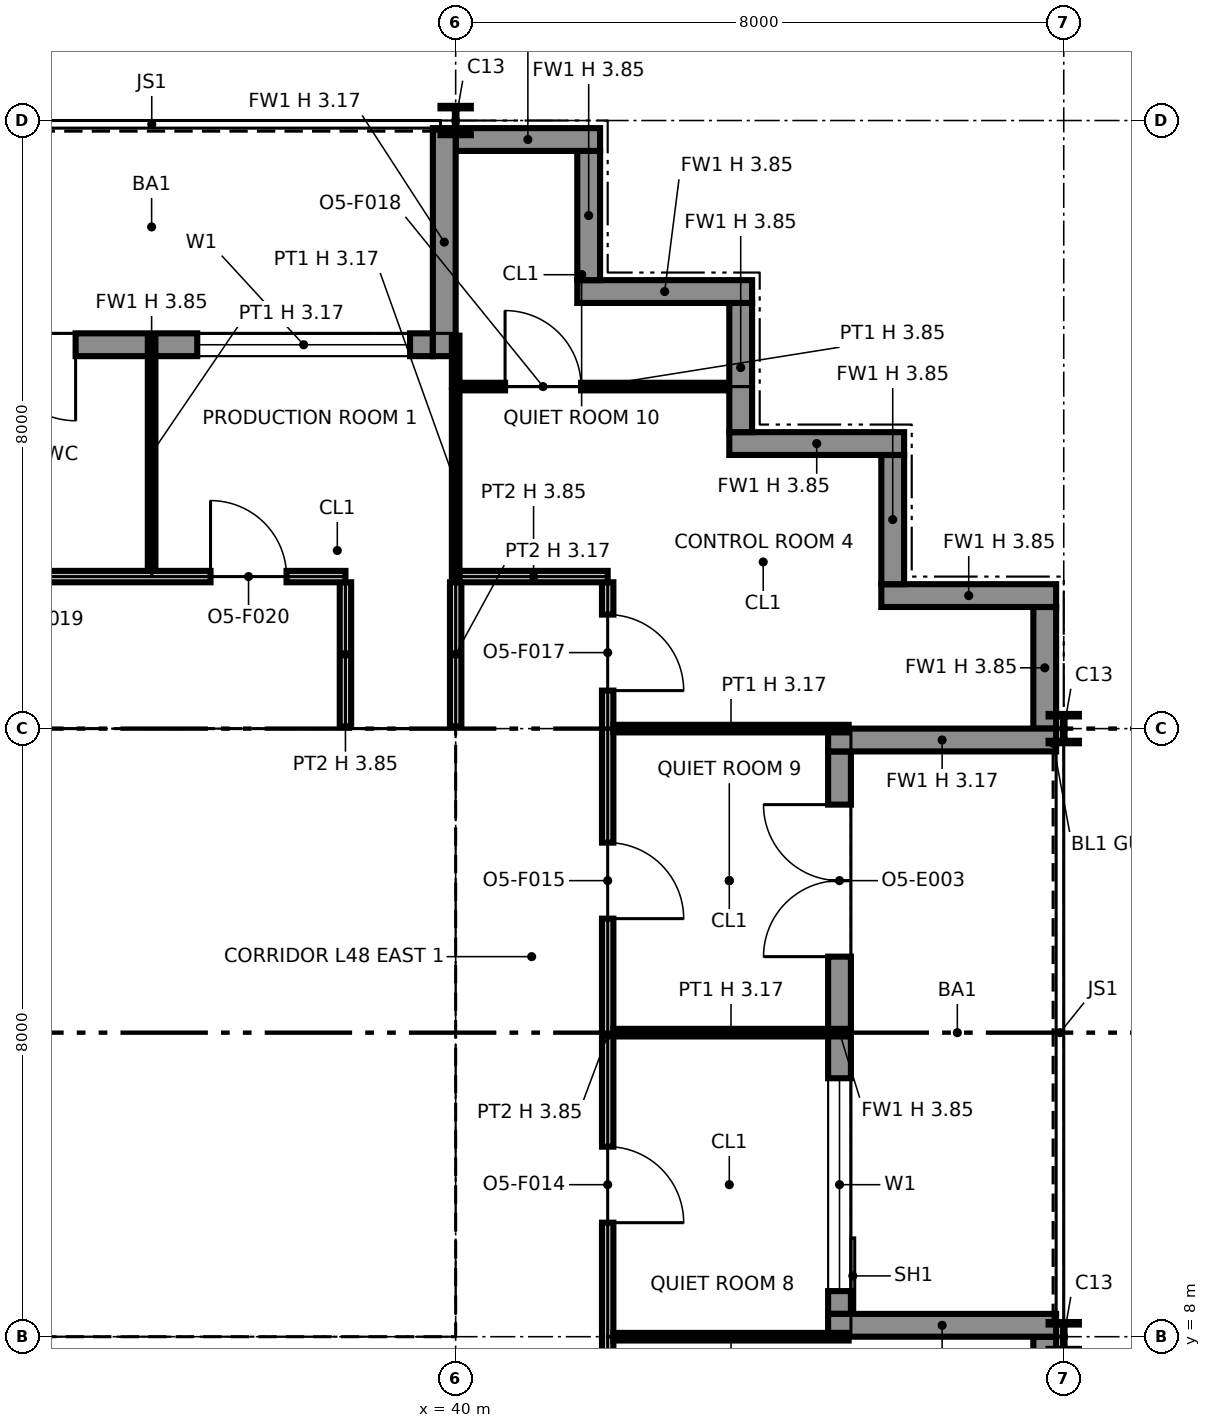
"""IFC4 building model, lengths in metres.
Left out: names, types, materials, properties, quantities, classifications, styles, units other than length and angle.
Written with IfcOpenShell. Run it as: python <this file> out.ifc"""

import sys

from ifc_helpers import new_model, si_unit, direction, frame, frame_2d, origin, origin_2d, place, context, subcontext, project, spatial, polyline, rectangle, i_section, outline, extrude, element, fill, save


model = new_model("IFC4")
c1 = context("Model", 3, precision=1e-05, world=origin(), true_north=direction((0.0, 1.0)))
c2 = subcontext(c1, "Body", "Model", "MODEL_VIEW")
j1 = project(units=[si_unit("LENGTHUNIT", "METRE"), si_unit("PLANEANGLEUNIT", "RADIAN")], contexts=[c1])
p1 = place(None, origin())
s1 = spatial("IfcSite", under=j1, at=p1, CompositionType="ELEMENT")
p2 = place(p1, origin())
s2 = spatial("IfcBuilding", under=s1, at=p2, CompositionType="ELEMENT")
p3 = place(p2, frame((0.0, 0.0, 225.0)))
s3 = spatial("IfcBuildingStorey", under=s2, at=p3, CompositionType="ELEMENT", Elevation=225.0)
for number, where, z_axis, x_axis in (
    (1, (40.0, 8.0, 0.0), (0.0, 0.0, 1.0), (1.0, 0.0, 0.0)),
    (2, (40.0, 16.0, 0.0), (0.0, 0.0, 1.0), (1.0, 0.0, 0.0)),
):
    element("IfcColumn", number, at=place(p3, frame(where, z_axis=z_axis, x_axis=x_axis)), inside=s3, PredefinedType="COLUMN", context=c2, shape_type="SweptSolid", body=[
        extrude(i_section(OverallWidth=0.373, OverallDepth=0.368, WebThickness=0.015, FlangeThickness=0.024, at=origin_2d()), origin(), (0.0, 0.0, 1.0), 3.85),
    ])
for number, where, z_axis, x_axis in (
    (3, (40.0, 24.0, 0.0), (0.0, 0.0, 1.0), (1.0, 0.0, 0.0)),
    (4, (48.0, 8.0, 0.0), (0.0, 0.0, 1.0), (1.0, 0.0, 0.0)),
    (5, (48.0, 16.0, 0.0), (0.0, 0.0, 1.0), (1.0, 0.0, 0.0)),
):
    element("IfcColumn", number, at=place(p3, frame(where, z_axis=z_axis, x_axis=x_axis)), inside=s3, PredefinedType="COLUMN", context=c2, shape_type="SweptSolid", body=[
        extrude(i_section(OverallWidth=0.399, OverallDepth=0.386, WebThickness=0.021, FlangeThickness=0.033, at=origin_2d()), origin(), (0.0, 0.0, 1.0), 3.85),
    ])
p4 = place(p3, frame((47.75, 6.4, 0.0), z_axis=(0.0, 0.0, 1.0), x_axis=(0.0, 1.0, 0.0)))
e6 = element("IfcWall", 6, at=p4, inside=s3, PredefinedType="SOLIDWALL", context=c2, shape_type="SweptSolid", body=[
    extrude(rectangle(XDim=1.6, YDim=0.3, at=frame_2d((0.8, 0.0))), origin(), (0.0, 0.0, 1.0), 3.85),
])
p5 = place(p3, frame((45.05, 8.3, 0.0), z_axis=(0.0, 0.0, 1.0), x_axis=(0.0, 1.0, 0.0)))
e7 = element("IfcWall", 7, at=p5, inside=s3, PredefinedType="SOLIDWALL", context=c2, shape_type="SweptSolid", body=[
    extrude(rectangle(XDim=7.4, YDim=0.3, at=frame_2d((3.7, 0.0))), origin(), (0.0, 0.0, 1.0), 3.85),
])
p6 = place(p5, frame((0.3, 0.0, 0.9)))
e8 = element("IfcOpeningElement", 8, at=p6, cuts=e7, PredefinedType="OPENING", context=c2, shape_type="SweptSolid", body=[
    extrude(rectangle(XDim=2.8, YDim=2.2, at=frame_2d((1.4, 1.1))), frame((0.0, 0.16, 0.0), z_axis=(0.0, -1.0, 0.0), x_axis=(1.0, 0.0, 0.0)), (0.0, 0.0, 1.0), 0.32),
])
p7 = place(p5, frame((4.7, 0.0, 0.0)))
e9 = element("IfcOpeningElement", 9, at=p7, cuts=e7, PredefinedType="OPENING", context=c2, shape_type="SweptSolid", body=[
    extrude(rectangle(XDim=2.0, YDim=2.4, at=frame_2d((1.0, 1.2))), frame((0.0, 0.16, 0.0), z_axis=(0.0, -1.0, 0.0), x_axis=(1.0, 0.0, 0.0)), (0.0, 0.0, 1.0), 0.32),
])
for number, where, z_axis, x_axis in (
    (10, (47.9, 8.15, 0.0), (0.0, 0.0, 1.0), (-1.0, 0.0, 0.0)),
    (11, (47.9, 15.85, 0.0), (0.0, 0.0, 1.0), (-1.0, 0.0, 0.0)),
):
    element("IfcWall", number, at=place(p3, frame(where, z_axis=z_axis, x_axis=x_axis)), inside=s3, PredefinedType="SOLIDWALL", context=c2, shape_type="SweptSolid", body=[
        extrude(rectangle(XDim=3.0, YDim=0.3, at=frame_2d((1.5, 0.0))), origin(), (0.0, 0.0, 1.0), 3.171),
    ])
p8 = place(p3, frame((47.75, 16.0, 0.0), z_axis=(0.0, 0.0, 1.0), x_axis=(0.0, 1.0, 0.0)))
e12 = element("IfcWall", 12, at=p8, inside=s3, PredefinedType="SOLIDWALL", context=c2, shape_type="SweptSolid", body=[
    extrude(rectangle(XDim=1.6, YDim=0.3, at=frame_2d((0.8, 0.0))), origin(), (0.0, 0.0, 1.0), 3.85),
])
p9 = place(p3, frame((47.9, 17.75, 0.0), z_axis=(0.0, 0.0, 1.0), x_axis=(-1.0, 0.0, 0.0)))
e13 = element("IfcWall", 13, at=p9, inside=s3, PredefinedType="SOLIDWALL", context=c2, shape_type="SweptSolid", body=[
    extrude(rectangle(XDim=2.3, YDim=0.3, at=frame_2d((1.15, 0.0))), origin(), (0.0, 0.0, 1.0), 3.85),
])
p10 = place(p3, frame((45.75, 17.9, 0.0), z_axis=(0.0, 0.0, 1.0), x_axis=(0.0, 1.0, 0.0)))
e14 = element("IfcWall", 14, at=p10, inside=s3, PredefinedType="SOLIDWALL", context=c2, shape_type="SweptSolid", body=[
    extrude(rectangle(XDim=1.7, YDim=0.3, at=frame_2d((0.85, 0.0))), origin(), (0.0, 0.0, 1.0), 3.85),
])
p11 = place(p3, frame((45.9, 19.75, 0.0), z_axis=(0.0, 0.0, 1.0), x_axis=(-1.0, 0.0, 0.0)))
e15 = element("IfcWall", 15, at=p11, inside=s3, PredefinedType="SOLIDWALL", context=c2, shape_type="SweptSolid", body=[
    extrude(rectangle(XDim=2.3, YDim=0.3, at=frame_2d((1.15, 0.0))), origin(), (0.0, 0.0, 1.0), 3.85),
])
p12 = place(p3, frame((43.75, 19.9, 0.0), z_axis=(0.0, 0.0, 1.0), x_axis=(0.0, 1.0, 0.0)))
e16 = element("IfcWall", 16, at=p12, inside=s3, PredefinedType="SOLIDWALL", context=c2, shape_type="SweptSolid", body=[
    extrude(rectangle(XDim=1.7, YDim=0.3, at=frame_2d((0.85, 0.0))), origin(), (0.0, 0.0, 1.0), 3.85),
])
p13 = place(p3, frame((43.9, 21.75, 0.0), z_axis=(0.0, 0.0, 1.0), x_axis=(-1.0, 0.0, 0.0)))
e17 = element("IfcWall", 17, at=p13, inside=s3, PredefinedType="SOLIDWALL", context=c2, shape_type="SweptSolid", body=[
    extrude(rectangle(XDim=2.3, YDim=0.3, at=frame_2d((1.15, 0.0))), origin(), (0.0, 0.0, 1.0), 3.85),
])
p14 = place(p3, frame((41.75, 21.9, 0.0), z_axis=(0.0, 0.0, 1.0), x_axis=(0.0, 1.0, 0.0)))
e18 = element("IfcWall", 18, at=p14, inside=s3, PredefinedType="SOLIDWALL", context=c2, shape_type="SweptSolid", body=[
    extrude(rectangle(XDim=1.7, YDim=0.3, at=frame_2d((0.85, 0.0))), origin(), (0.0, 0.0, 1.0), 3.85),
])
p15 = place(p3, frame((41.9, 23.75, 0.0), z_axis=(0.0, 0.0, 1.0), x_axis=(-1.0, 0.0, 0.0)))
e19 = element("IfcWall", 19, at=p15, inside=s3, PredefinedType="SOLIDWALL", context=c2, shape_type="SweptSolid", body=[
    extrude(rectangle(XDim=1.9, YDim=0.3, at=frame_2d((0.95, 0.0))), origin(), (0.0, 0.0, 1.0), 3.85),
])
p16 = place(p3, frame((39.7, 21.05, 0.0), z_axis=(0.0, 0.0, 1.0), x_axis=(-1.0, 0.0, 0.0)))
e20 = element("IfcWall", 20, at=p16, inside=s3, PredefinedType="SOLIDWALL", context=c2, shape_type="SweptSolid", body=[
    extrude(rectangle(XDim=7.4, YDim=0.3, at=frame_2d((3.7, 0.0))), origin(), (0.0, 0.0, 1.0), 3.85),
])
p17 = place(p16, frame((0.3, 0.0, 0.9)))
e21 = element("IfcOpeningElement", 21, at=p17, cuts=e20, PredefinedType="OPENING", context=c2, shape_type="SweptSolid", body=[
    extrude(rectangle(XDim=2.8, YDim=2.2, at=frame_2d((1.4, 1.1))), frame((0.0, 0.16, 0.0), z_axis=(0.0, -1.0, 0.0), x_axis=(1.0, 0.0, 0.0)), (0.0, 0.0, 1.0), 0.32),
])
p18 = place(p16, frame((4.7, 0.0, 0.0)))
e22 = element("IfcOpeningElement", 22, at=p18, cuts=e20, PredefinedType="OPENING", context=c2, shape_type="SweptSolid", body=[
    extrude(rectangle(XDim=2.0, YDim=2.4, at=frame_2d((1.0, 1.2))), frame((0.0, 0.16, 0.0), z_axis=(0.0, -1.0, 0.0), x_axis=(1.0, 0.0, 0.0)), (0.0, 0.0, 1.0), 0.32),
])
p19 = place(p3, frame((39.85, 23.9, 0.0), z_axis=(0.0, 0.0, 1.0), x_axis=(0.0, -1.0, 0.0)))
e23 = element("IfcWall", 23, at=p19, inside=s3, PredefinedType="SOLIDWALL", context=c2, shape_type="SweptSolid", body=[
    extrude(rectangle(XDim=3.0, YDim=0.3, at=frame_2d((1.5, 0.0))), origin(), (0.0, 0.0, 1.0), 3.171),
])
p20 = place(p3, frame((24.65, 8.75, 0.0), z_axis=(0.0, 0.0, 1.0), x_axis=(1.0, 0.0, 0.0)))
e24 = element("IfcWall", 24, at=p20, inside=s3, PredefinedType="PARTITIONING", context=c2, shape_type="SweptSolid", body=[
    extrude(outline(polyline([(0.0, 0.0), (14.7, 0.0), (14.7, 3.85), (7.438, 3.85), (7.438, 3.308), (7.262, 3.308), (7.261, 3.85), (0.0, 3.85), (0.0, 0.0)])), frame((0.0, 0.1, 0.0), z_axis=(0.0, -1.0, 0.0), x_axis=(1.0, 0.0, 0.0)), (0.0, 0.0, 1.0), 0.2),
])
p21 = place(p3, frame((24.65, 15.25, 0.0), z_axis=(0.0, 0.0, 1.0), x_axis=(1.0, 0.0, 0.0)))
e25 = element("IfcWall", 25, at=p21, inside=s3, PredefinedType="PARTITIONING", context=c2, shape_type="SweptSolid", body=[
    extrude(outline(polyline([(0.0, 0.0), (14.7, 0.0), (14.7, 3.85), (7.438, 3.85), (7.438, 3.308), (7.262, 3.308), (7.261, 3.85), (0.0, 3.85), (0.0, 0.0)])), frame((0.0, 0.1, 0.0), z_axis=(0.0, -1.0, 0.0), x_axis=(1.0, 0.0, 0.0)), (0.0, 0.0, 1.0), 0.2),
])
p22 = place(p21, frame((2.85, 0.0, 0.0)))
e26 = element("IfcOpeningElement", 26, at=p22, cuts=e25, PredefinedType="OPENING", context=c2, shape_type="SweptSolid", body=[
    extrude(rectangle(XDim=1.8, YDim=2.1, at=frame_2d((0.9, 1.05))), frame((0.0, 0.11, 0.0), z_axis=(0.0, -1.0, 0.0), x_axis=(1.0, 0.0, 0.0)), (0.0, 0.0, 1.0), 0.22),
])
p23 = place(p21, frame((9.95, 0.0, 0.0), z_axis=(0.0, 0.0, 1.0), x_axis=(-1.0, 0.0, 0.0)))
e27 = element("IfcOpeningElement", 27, at=p23, cuts=e25, PredefinedType="OPENING", context=c2, shape_type="SweptSolid", body=[
    extrude(rectangle(XDim=1.4, YDim=2.1, at=frame_2d((0.7, 1.05))), frame((0.0, 0.11, 0.0), z_axis=(0.0, -1.0, 0.0), x_axis=(1.0, 0.0, 0.0)), (0.0, 0.0, 1.0), 0.22),
])
p24 = place(p21, frame((13.4, 0.0, 0.0), z_axis=(0.0, 0.0, 1.0), x_axis=(-1.0, 0.0, 0.0)))
e28 = element("IfcOpeningElement", 28, at=p24, cuts=e25, PredefinedType="OPENING", context=c2, shape_type="SweptSolid", body=[
    extrude(rectangle(XDim=1.4, YDim=2.1, at=frame_2d((0.7, 1.05))), frame((0.0, 0.11, 0.0), z_axis=(0.0, -1.0, 0.0), x_axis=(1.0, 0.0, 0.0)), (0.0, 0.0, 1.0), 0.22),
])
for number, where, z_axis, x_axis in (
    (29, (35.6, 8.85, 0.0), (0.0, 0.0, 1.0), (0.0, 1.0, 0.0)),
    (30, (39.25, 8.85, 0.0), (0.0, 0.0, 1.0), (0.0, 1.0, 0.0)),
):
    element("IfcWall", number, at=place(p3, frame(where, z_axis=z_axis, x_axis=x_axis)), inside=s3, PredefinedType="PARTITIONING", context=c2, shape_type="SweptSolid", body=[
        extrude(rectangle(XDim=6.3, YDim=0.2, at=frame_2d((3.15, 0.0))), origin(), (0.0, 0.0, 1.0), 3.85),
    ])
p25 = place(p3, frame((42.0, 6.0, 0.0), z_axis=(0.0, 0.0, 1.0), x_axis=(0.0, 1.0, 0.0)))
e31 = element("IfcWall", 31, at=p25, inside=s3, PredefinedType="PARTITIONING", context=c2, shape_type="SweptSolid", body=[
    extrude(outline(polyline([(0.0, 0.0), (11.925, 0.0), (11.925, 3.85), (10.3, 3.85), (10.298, 3.172), (9.702, 3.172), (9.7, 3.85), (6.3, 3.85), (6.298, 3.172), (5.702, 3.172), (5.7, 3.85), (2.3, 3.85), (2.298, 3.172), (1.702, 3.172), (1.7, 3.85), (0.0, 3.85), (0.0, 0.0)])), frame((0.0, 0.075, 0.0), z_axis=(0.0, -1.0, 0.0), x_axis=(1.0, 0.0, 0.0)), (0.0, 0.0, 1.0), 0.15),
])
p26 = place(p25, frame((4.5, 0.0, 0.0), z_axis=(0.0, 0.0, 1.0), x_axis=(-1.0, 0.0, 0.0)))
e32 = element("IfcOpeningElement", 32, at=p26, cuts=e31, PredefinedType="OPENING", context=c2, shape_type="SweptSolid", body=[
    extrude(rectangle(XDim=1.0, YDim=2.1, at=frame_2d((0.5, 1.05))), frame((0.0, 0.085, 0.0), z_axis=(0.0, -1.0, 0.0), x_axis=(1.0, 0.0, 0.0)), (0.0, 0.0, 1.0), 0.17),
])
p27 = place(p25, frame((8.5, 0.0, 0.0), z_axis=(0.0, 0.0, 1.0), x_axis=(-1.0, 0.0, 0.0)))
e33 = element("IfcOpeningElement", 33, at=p27, cuts=e31, PredefinedType="OPENING", context=c2, shape_type="SweptSolid", body=[
    extrude(rectangle(XDim=1.0, YDim=2.1, at=frame_2d((0.5, 1.05))), frame((0.0, 0.085, 0.0), z_axis=(0.0, -1.0, 0.0), x_axis=(1.0, 0.0, 0.0)), (0.0, 0.0, 1.0), 0.17),
])
p28 = place(p25, frame((11.5, 0.0, 0.0), z_axis=(0.0, 0.0, 1.0), x_axis=(-1.0, 0.0, 0.0)))
e34 = element("IfcOpeningElement", 34, at=p28, cuts=e31, PredefinedType="OPENING", context=c2, shape_type="SweptSolid", body=[
    extrude(rectangle(XDim=1.0, YDim=2.1, at=frame_2d((0.5, 1.05))), frame((0.0, 0.085, 0.0), z_axis=(0.0, -1.0, 0.0), x_axis=(1.0, 0.0, 0.0)), (0.0, 0.0, 1.0), 0.17),
])
for number, where, z_axis, x_axis in (
    (35, (42.075, 8.0, 0.0), (0.0, 0.0, 1.0), (1.0, 0.0, 0.0)),
    (36, (42.075, 12.0, 0.0), (0.0, 0.0, 1.0), (1.0, 0.0, 0.0)),
    (37, (42.075, 16.0, 0.0), (0.0, 0.0, 1.0), (1.0, 0.0, 0.0)),
):
    element("IfcWall", number, at=place(p3, frame(where, z_axis=z_axis, x_axis=x_axis)), inside=s3, PredefinedType="PARTITIONING", context=c2, shape_type="SweptSolid", body=[
        extrude(rectangle(XDim=3.095, YDim=0.1, at=frame_2d((1.547, 0.0))), origin(), (0.0, 0.0, 1.0), 3.172),
    ])
p29 = place(p3, frame((38.55, 16.03, 0.0), z_axis=(0.0, 0.0, 1.0), x_axis=(0.0, 1.0, 0.0)))
e38 = element("IfcWall", 38, at=p29, inside=s3, PredefinedType="PARTITIONING", context=c2, shape_type="SweptSolid", body=[
    extrude(rectangle(XDim=1.895, YDim=0.15, at=frame_2d((0.948, 0.0))), origin(), (0.0, 0.0, 1.0), 3.85),
])
p30 = place(p3, frame((40.0, 16.03, 0.0), z_axis=(0.0, 0.0, 1.0), x_axis=(0.0, 1.0, 0.0)))
e39 = element("IfcWall", 39, at=p30, inside=s3, PredefinedType="PARTITIONING", context=c2, shape_type="SweptSolid", body=[
    extrude(rectangle(XDim=1.895, YDim=0.15, at=frame_2d((0.948, 0.0))), origin(), (0.0, 0.0, 1.0), 3.172),
])
p31 = place(p3, frame((26.075, 18.0, 0.0), z_axis=(0.0, 0.0, 1.0), x_axis=(1.0, 0.0, 0.0)))
e40 = element("IfcWall", 40, at=p31, inside=s3, PredefinedType="PARTITIONING", context=c2, shape_type="SweptSolid", body=[
    extrude(rectangle(XDim=12.475, YDim=0.15, at=frame_2d((6.238, 0.0))), origin(), (0.0, 0.0, 1.0), 3.85),
])
p32 = place(p31, frame((7.425, 0.0, 0.0)))
e41 = element("IfcOpeningElement", 41, at=p32, cuts=e40, PredefinedType="OPENING", context=c2, shape_type="SweptSolid", body=[
    extrude(rectangle(XDim=1.0, YDim=2.1, at=frame_2d((0.5, 1.05))), frame((0.0, 0.085, 0.0), z_axis=(0.0, -1.0, 0.0), x_axis=(1.0, 0.0, 0.0)), (0.0, 0.0, 1.0), 0.17),
])
p33 = place(p31, frame((10.7, 0.0, 0.0)))
e42 = element("IfcOpeningElement", 42, at=p33, cuts=e40, PredefinedType="OPENING", context=c2, shape_type="SweptSolid", body=[
    extrude(rectangle(XDim=1.0, YDim=2.1, at=frame_2d((0.5, 1.05))), frame((0.0, 0.085, 0.0), z_axis=(0.0, -1.0, 0.0), x_axis=(1.0, 0.0, 0.0)), (0.0, 0.0, 1.0), 0.17),
])
p34 = place(p31, frame((2.925, 0.0, 0.0)))
e43 = element("IfcOpeningElement", 43, at=p34, cuts=e40, PredefinedType="OPENING", context=c2, shape_type="SweptSolid", body=[
    extrude(rectangle(XDim=1.0, YDim=2.1, at=frame_2d((0.5, 1.05))), frame((0.0, 0.085, 0.0), z_axis=(0.0, -1.0, 0.0), x_axis=(1.0, 0.0, 0.0)), (0.0, 0.0, 1.0), 0.17),
])
p35 = place(p3, frame((36.0, 18.075, 0.0), z_axis=(0.0, 0.0, 1.0), x_axis=(0.0, 1.0, 0.0)))
e44 = element("IfcWall", 44, at=p35, inside=s3, PredefinedType="PARTITIONING", context=c2, shape_type="SweptSolid", body=[
    extrude(rectangle(XDim=3.095, YDim=0.1, at=frame_2d((1.547, 0.0))), origin(), (0.0, 0.0, 1.0), 3.172),
])
p36 = place(p3, frame((40.05, 18.0, 0.0), z_axis=(0.0, 0.0, 1.0), x_axis=(1.0, 0.0, 0.0)))
e45 = element("IfcWall", 45, at=p36, inside=s3, PredefinedType="PARTITIONING", context=c2, shape_type="SweptSolid", body=[
    extrude(rectangle(XDim=1.95, YDim=0.15, at=frame_2d((0.975, 0.0))), origin(), (0.0, 0.0, 1.0), 3.85),
])
p37 = place(p3, frame((40.0, 18.0, 0.0), z_axis=(0.0, 0.0, 1.0), x_axis=(0.0, 1.0, 0.0)))
e46 = element("IfcWall", 46, at=p37, inside=s3, PredefinedType="PARTITIONING", context=c2, shape_type="SweptSolid", body=[
    extrude(rectangle(XDim=2.45, YDim=0.1, at=frame_2d((1.225, 0.0))), origin(), (0.0, 0.0, 1.0), 3.172),
])
p38 = place(p3, frame((40.05, 20.5, 0.0), z_axis=(0.0, 0.0, 1.0), x_axis=(1.0, 0.0, 0.0)))
e47 = element("IfcWall", 47, at=p38, inside=s3, PredefinedType="PARTITIONING", context=c2, shape_type="SweptSolid", body=[
    extrude(rectangle(XDim=3.52, YDim=0.1, at=frame_2d((1.76, 0.0))), origin(), (0.0, 0.0, 1.0), 3.85),
])
p39 = place(p38, frame((0.6, 0.0, 0.0)))
e48 = element("IfcOpeningElement", 48, at=p39, cuts=e47, PredefinedType="OPENING", context=c2, shape_type="SweptSolid", body=[
    extrude(rectangle(XDim=1.0, YDim=2.1, at=frame_2d((0.5, 1.05))), frame((0.0, 0.06, 0.0), z_axis=(0.0, -1.0, 0.0), x_axis=(1.0, 0.0, 0.0)), (0.0, 0.0, 1.0), 0.12),
])
p40 = place(p3, frame((40.0, 20.5, 0.0), z_axis=(0.0, 0.0, 1.0), x_axis=(0.0, 1.0, 0.0)))
e49 = element("IfcWall", 49, at=p40, inside=s3, PredefinedType="PARTITIONING", context=c2, shape_type="SweptSolid", body=[
    extrude(rectangle(XDim=0.67, YDim=0.1, at=frame_2d((0.335, 0.0))), origin(), (0.0, 0.0, 1.0), 3.172),
])
p41 = place(p6, origin())
e50 = element("IfcWindow", 50, at=p41, inside=s3, PartitioningType="SINGLE_PANEL", PredefinedType="WINDOW", context=c2, shape_type="SweptSolid", body=[
    extrude(rectangle(XDim=2.8, YDim=2.2, at=frame_2d((1.4, 1.1))), frame((0.0, 0.03, 0.0), z_axis=(0.0, -1.0, 0.0), x_axis=(1.0, 0.0, 0.0)), (0.0, 0.0, 1.0), 0.06),
])
fill(e8, e50)
p42 = place(p7, origin())
e51 = element("IfcDoor", 51, at=p42, inside=s3, OperationType="DOUBLE_DOOR_SINGLE_SWING", PredefinedType="DOOR", context=c2, shape_type="SweptSolid", body=[
    extrude(rectangle(XDim=2.0, YDim=2.4, at=frame_2d((1.0, 1.2))), frame((0.0, 0.025, 0.0), z_axis=(0.0, -1.0, 0.0), x_axis=(1.0, 0.0, 0.0)), (0.0, 0.0, 1.0), 0.05),
])
fill(e9, e51)
p43 = place(p17, origin())
e52 = element("IfcWindow", 52, at=p43, inside=s3, PartitioningType="SINGLE_PANEL", PredefinedType="WINDOW", context=c2, shape_type="SweptSolid", body=[
    extrude(rectangle(XDim=2.8, YDim=2.2, at=frame_2d((1.4, 1.1))), frame((0.0, 0.03, 0.0), z_axis=(0.0, -1.0, 0.0), x_axis=(1.0, 0.0, 0.0)), (0.0, 0.0, 1.0), 0.06),
])
fill(e21, e52)
p44 = place(p18, origin())
e53 = element("IfcDoor", 53, at=p44, inside=s3, OperationType="DOUBLE_DOOR_SINGLE_SWING", PredefinedType="DOOR", context=c2, shape_type="SweptSolid", body=[
    extrude(rectangle(XDim=2.0, YDim=2.4, at=frame_2d((1.0, 1.2))), frame((0.0, 0.025, 0.0), z_axis=(0.0, -1.0, 0.0), x_axis=(1.0, 0.0, 0.0)), (0.0, 0.0, 1.0), 0.05),
])
fill(e22, e53)
p45 = place(p24, origin())
e54 = element("IfcDoor", 54, at=p45, inside=s3, OperationType="DOUBLE_DOOR_SINGLE_SWING", PredefinedType="NOTDEFINED", context=c2, shape_type="SweptSolid", body=[
    extrude(rectangle(XDim=1.4, YDim=2.1, at=frame_2d((0.7, 1.05))), frame((0.0, 0.025, 0.0), z_axis=(0.0, -1.0, 0.0), x_axis=(1.0, 0.0, 0.0)), (0.0, 0.0, 1.0), 0.05),
])
fill(e28, e54)
p46 = place(p26, origin())
e55 = element("IfcDoor", 55, at=p46, inside=s3, OperationType="SINGLE_SWING_RIGHT", PredefinedType="DOOR", context=c2, shape_type="SweptSolid", body=[
    extrude(rectangle(XDim=1.0, YDim=2.1, at=frame_2d((0.5, 1.05))), frame((0.0, 0.025, 0.0), z_axis=(0.0, -1.0, 0.0), x_axis=(1.0, 0.0, 0.0)), (0.0, 0.0, 1.0), 0.05),
])
fill(e32, e55)
p47 = place(p27, origin())
e56 = element("IfcDoor", 56, at=p47, inside=s3, OperationType="SINGLE_SWING_RIGHT", PredefinedType="DOOR", context=c2, shape_type="SweptSolid", body=[
    extrude(rectangle(XDim=1.0, YDim=2.1, at=frame_2d((0.5, 1.05))), frame((0.0, 0.025, 0.0), z_axis=(0.0, -1.0, 0.0), x_axis=(1.0, 0.0, 0.0)), (0.0, 0.0, 1.0), 0.05),
])
fill(e33, e56)
p48 = place(p28, origin())
e57 = element("IfcDoor", 57, at=p48, inside=s3, OperationType="SINGLE_SWING_RIGHT", PredefinedType="DOOR", context=c2, shape_type="SweptSolid", body=[
    extrude(rectangle(XDim=1.0, YDim=2.1, at=frame_2d((0.5, 1.05))), frame((0.0, 0.025, 0.0), z_axis=(0.0, -1.0, 0.0), x_axis=(1.0, 0.0, 0.0)), (0.0, 0.0, 1.0), 0.05),
])
fill(e34, e57)
p49 = place(p39, origin())
e58 = element("IfcDoor", 58, at=p49, inside=s3, OperationType="SINGLE_SWING_LEFT", PredefinedType="DOOR", context=c2, shape_type="SweptSolid", body=[
    extrude(rectangle(XDim=1.0, YDim=2.1, at=frame_2d((0.5, 1.05))), frame((0.0, 0.025, 0.0), z_axis=(0.0, -1.0, 0.0), x_axis=(1.0, 0.0, 0.0)), (0.0, 0.0, 1.0), 0.05),
])
fill(e48, e58)
p50 = place(p33, origin())
e59 = element("IfcDoor", 59, at=p50, inside=s3, OperationType="SINGLE_SWING_LEFT", PredefinedType="DOOR", context=c2, shape_type="SweptSolid", body=[
    extrude(rectangle(XDim=1.0, YDim=2.1, at=frame_2d((0.5, 1.05))), frame((0.0, 0.025, 0.0), z_axis=(0.0, -1.0, 0.0), x_axis=(1.0, 0.0, 0.0)), (0.0, 0.0, 1.0), 0.05),
])
fill(e42, e59)
save(model, sys.argv[1])
